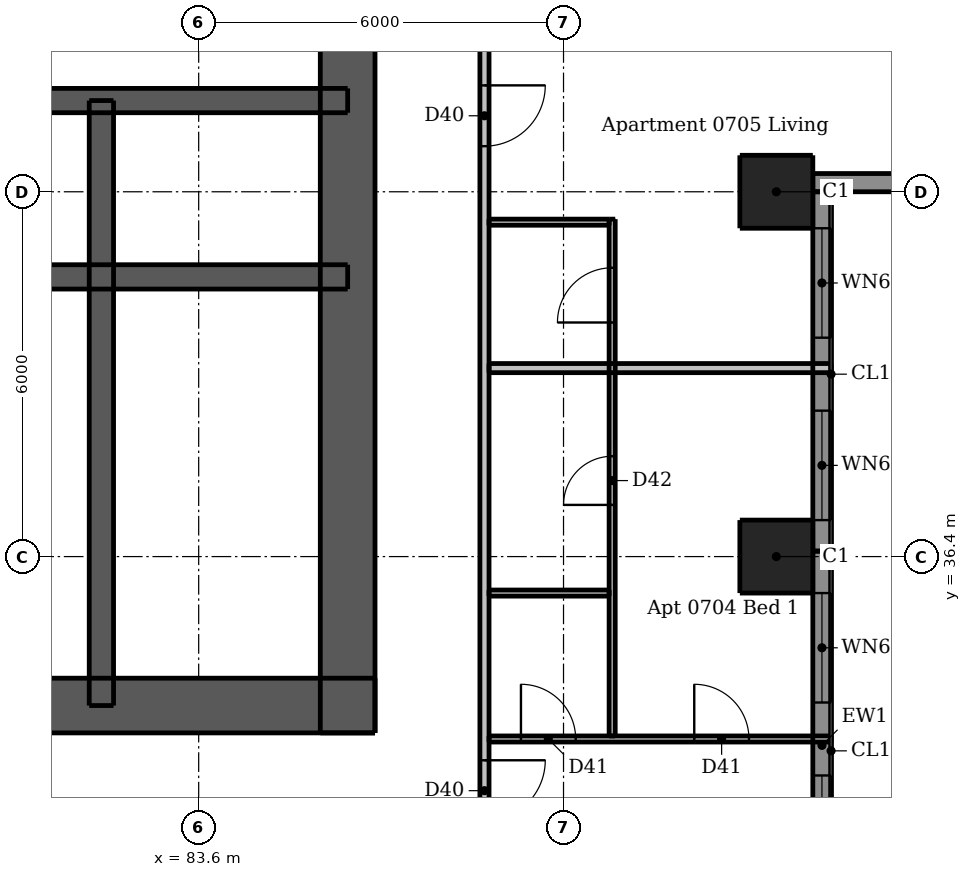
"""IFC4 building model, lengths in metres.
Left out: names, types, materials, properties, quantities, classifications, styles, units other than length and angle.
Written with IfcOpenShell. Run it as: python <this file> out.ifc"""

import sys

from ifc_helpers import new_model, si_unit, direction, frame, frame_2d, origin, origin_2d, place, context, subcontext, project, spatial, rectangle, extrude, element, fill, save


model = new_model("IFC4")
c1 = context("Model", 3, precision=1e-05, world=origin(), true_north=direction((0.0, 1.0)))
c2 = subcontext(c1, "Body", "Model", "MODEL_VIEW")
j1 = project(units=[si_unit("LENGTHUNIT", "METRE"), si_unit("PLANEANGLEUNIT", "RADIAN")], contexts=[c1])
p1 = place(None, origin())
s1 = spatial("IfcSite", under=j1, at=p1, CompositionType="ELEMENT")
p2 = place(p1, origin())
s2 = spatial("IfcBuilding", under=s1, at=p2, CompositionType="ELEMENT")
p3 = place(p2, frame((0.0, 0.0, 30.1)))
s3 = spatial("IfcBuildingStorey", under=s2, at=p3, CompositionType="ELEMENT", Elevation=30.1)
p4 = place(p3, frame((62.5, 33.95, 0.0), z_axis=(0.0, 0.0, 1.0), x_axis=(1.0, 0.0, 0.0)))
e1 = element("IfcWall", 1, at=p4, inside=s3, PredefinedType="SHEAR", context=c2, shape_type="SweptSolid", body=[
    extrude(rectangle(XDim=24.0, YDim=0.9, at=frame_2d((12.0, 0.0))), origin(), (0.0, 0.0, 1.0), 3.05),
])
p5 = place(p4, frame((2.05, 0.0, 0.0)))
e2 = element("IfcOpeningElement", 2, at=p5, cuts=e1, PredefinedType="OPENING", context=c2, shape_type="SweptSolid", body=[
    extrude(rectangle(XDim=1.1, YDim=2.1, at=frame_2d((0.55, 1.05))), frame((0.0, 0.46, 0.0), z_axis=(0.0, -1.0, 0.0), x_axis=(1.0, 0.0, 0.0)), (0.0, 0.0, 1.0), 0.92),
])
p6 = place(p4, frame((20.85, 0.0, 0.0)))
e3 = element("IfcOpeningElement", 3, at=p6, cuts=e1, PredefinedType="OPENING", context=c2, shape_type="SweptSolid", body=[
    extrude(rectangle(XDim=1.1, YDim=2.1, at=frame_2d((0.55, 1.05))), frame((0.0, 0.46, 0.0), z_axis=(0.0, -1.0, 0.0), x_axis=(1.0, 0.0, 0.0)), (0.0, 0.0, 1.0), 0.92),
])
p7 = place(p4, frame((8.0, 0.0, 0.0)))
e4 = element("IfcOpeningElement", 4, at=p7, cuts=e1, PredefinedType="OPENING", context=c2, shape_type="SweptSolid", body=[
    extrude(rectangle(XDim=1.1, YDim=2.1, at=frame_2d((0.55, 1.05))), frame((0.0, 0.46, 0.0), z_axis=(0.0, -1.0, 0.0), x_axis=(1.0, 0.0, 0.0)), (0.0, 0.0, 1.0), 0.92),
])
p8 = place(p4, frame((15.3, 0.0, 0.0)))
e5 = element("IfcOpeningElement", 5, at=p8, cuts=e1, PredefinedType="OPENING", context=c2, shape_type="SweptSolid", body=[
    extrude(rectangle(XDim=0.9, YDim=2.1, at=frame_2d((0.45, 1.05))), frame((0.0, 0.46, 0.0), z_axis=(0.0, -1.0, 0.0), x_axis=(1.0, 0.0, 0.0)), (0.0, 0.0, 1.0), 0.92),
])
p9 = place(p3, frame((86.05, 33.5, 0.0), z_axis=(0.0, 0.0, 1.0), x_axis=(0.0, 1.0, 0.0)))
e6 = element("IfcWall", 6, at=p9, inside=s3, PredefinedType="SHEAR", context=c2, shape_type="SweptSolid", body=[
    extrude(rectangle(XDim=24.0, YDim=0.9, at=frame_2d((12.0, 0.0))), origin(), (0.0, 0.0, 1.0), 3.05),
])
p10 = place(p9, frame((11.2, 0.0, 0.0)))
e7 = element("IfcOpeningElement", 7, at=p10, cuts=e6, PredefinedType="OPENING", context=c2, shape_type="SweptSolid", body=[
    extrude(rectangle(XDim=1.6, YDim=2.1, at=frame_2d((0.8, 1.05))), frame((0.0, 0.46, 0.0), z_axis=(0.0, -1.0, 0.0), x_axis=(1.0, 0.0, 0.0)), (0.0, 0.0, 1.0), 0.92),
])
p11 = place(p3, frame((62.95, 41.0, 0.0), z_axis=(0.0, 0.0, 1.0), x_axis=(1.0, 0.0, 0.0)))
e8 = element("IfcWall", 8, at=p11, inside=s3, PredefinedType="SHEAR", context=c2, shape_type="SweptSolid", body=[
    extrude(rectangle(XDim=23.1, YDim=0.4, at=frame_2d((11.55, 0.0))), origin(), (0.0, 0.0, 1.0), 3.05),
])
p12 = place(p3, frame((62.95, 43.9, 0.0), z_axis=(0.0, 0.0, 1.0), x_axis=(1.0, 0.0, 0.0)))
e9 = element("IfcWall", 9, at=p12, inside=s3, PredefinedType="SHEAR", context=c2, shape_type="SweptSolid", body=[
    extrude(rectangle(XDim=23.1, YDim=0.4, at=frame_2d((11.55, 0.0))), origin(), (0.0, 0.0, 1.0), 3.05),
])
p13 = place(p12, frame((1.7, 0.0, 0.0)))
e10 = element("IfcOpeningElement", 10, at=p13, cuts=e9, PredefinedType="OPENING", context=c2, shape_type="SweptSolid", body=[
    extrude(rectangle(XDim=0.9, YDim=2.1, at=frame_2d((0.45, 1.05))), frame((0.0, 0.21, 0.0), z_axis=(0.0, -1.0, 0.0), x_axis=(1.0, 0.0, 0.0)), (0.0, 0.0, 1.0), 0.42),
])
p14 = place(p12, frame((20.5, 0.0, 0.0)))
e11 = element("IfcOpeningElement", 11, at=p14, cuts=e9, PredefinedType="OPENING", context=c2, shape_type="SweptSolid", body=[
    extrude(rectangle(XDim=0.9, YDim=2.1, at=frame_2d((0.45, 1.05))), frame((0.0, 0.21, 0.0), z_axis=(0.0, -1.0, 0.0), x_axis=(1.0, 0.0, 0.0)), (0.0, 0.0, 1.0), 0.42),
])
p15 = place(p12, frame((4.75, 0.0, 0.0)))
e12 = element("IfcOpeningElement", 12, at=p15, cuts=e9, PredefinedType="OPENING", context=c2, shape_type="SweptSolid", body=[
    extrude(rectangle(XDim=1.1, YDim=2.1, at=frame_2d((0.55, 1.05))), frame((0.0, 0.21, 0.0), z_axis=(0.0, -1.0, 0.0), x_axis=(1.0, 0.0, 0.0)), (0.0, 0.0, 1.0), 0.42),
])
p16 = place(p12, frame((7.25, 0.0, 0.0)))
e13 = element("IfcOpeningElement", 13, at=p16, cuts=e9, PredefinedType="OPENING", context=c2, shape_type="SweptSolid", body=[
    extrude(rectangle(XDim=1.1, YDim=2.1, at=frame_2d((0.55, 1.05))), frame((0.0, 0.21, 0.0), z_axis=(0.0, -1.0, 0.0), x_axis=(1.0, 0.0, 0.0)), (0.0, 0.0, 1.0), 0.42),
])
p17 = place(p12, frame((9.75, 0.0, 0.0)))
e14 = element("IfcOpeningElement", 14, at=p17, cuts=e9, PredefinedType="OPENING", context=c2, shape_type="SweptSolid", body=[
    extrude(rectangle(XDim=1.1, YDim=2.1, at=frame_2d((0.55, 1.05))), frame((0.0, 0.21, 0.0), z_axis=(0.0, -1.0, 0.0), x_axis=(1.0, 0.0, 0.0)), (0.0, 0.0, 1.0), 0.42),
])
p18 = place(p12, frame((12.25, 0.0, 0.0)))
e15 = element("IfcOpeningElement", 15, at=p18, cuts=e9, PredefinedType="OPENING", context=c2, shape_type="SweptSolid", body=[
    extrude(rectangle(XDim=1.1, YDim=2.1, at=frame_2d((0.55, 1.05))), frame((0.0, 0.21, 0.0), z_axis=(0.0, -1.0, 0.0), x_axis=(1.0, 0.0, 0.0)), (0.0, 0.0, 1.0), 0.42),
])
p19 = place(p12, frame((14.75, 0.0, 0.0)))
e16 = element("IfcOpeningElement", 16, at=p19, cuts=e9, PredefinedType="OPENING", context=c2, shape_type="SweptSolid", body=[
    extrude(rectangle(XDim=1.1, YDim=2.1, at=frame_2d((0.55, 1.05))), frame((0.0, 0.21, 0.0), z_axis=(0.0, -1.0, 0.0), x_axis=(1.0, 0.0, 0.0)), (0.0, 0.0, 1.0), 0.42),
])
p20 = place(p12, frame((17.25, 0.0, 0.0)))
e17 = element("IfcOpeningElement", 17, at=p20, cuts=e9, PredefinedType="OPENING", context=c2, shape_type="SweptSolid", body=[
    extrude(rectangle(XDim=1.1, YDim=2.1, at=frame_2d((0.55, 1.05))), frame((0.0, 0.21, 0.0), z_axis=(0.0, -1.0, 0.0), x_axis=(1.0, 0.0, 0.0)), (0.0, 0.0, 1.0), 0.42),
])
p21 = place(p3, frame((82.0, 33.95, 0.0), z_axis=(0.0, 0.0, 1.0), x_axis=(0.0, 1.0, 0.0)))
e18 = element("IfcWall", 18, at=p21, inside=s3, PredefinedType="SHEAR", context=c2, shape_type="SweptSolid", body=[
    extrude(rectangle(XDim=9.95, YDim=0.4, at=frame_2d((4.975, 0.0))), origin(), (0.0, 0.0, 1.0), 3.05),
])
for number, where, z_axis, x_axis in (
    (19, (93.1, 36.4, 0.0), (0.0, 0.0, 1.0), (1.0, 0.0, 0.0)),
    (20, (93.1, 42.4, 0.0), (0.0, 0.0, 1.0), (1.0, 0.0, 0.0)),
):
    element("IfcColumn", number, at=place(p3, frame(where, z_axis=z_axis, x_axis=x_axis)), inside=s3, PredefinedType="COLUMN", context=c2, shape_type="SweptSolid", body=[
        extrude(rectangle(XDim=1.2, YDim=1.2, at=origin_2d()), origin(), (0.0, 0.0, 1.0), 3.05),
    ])
p22 = place(p3, frame((93.7, 42.55, 0.0), z_axis=(0.0, 0.0, 1.0), x_axis=(1.0, 0.0, 0.0)))
e21 = element("IfcWall", 21, at=p22, inside=s3, PredefinedType="SOLIDWALL", context=c2, shape_type="SweptSolid", body=[
    extrude(rectangle(XDim=4.8, YDim=0.3, at=frame_2d((2.4, 0.0))), origin(), (0.0, 0.0, 1.0), 3.05),
])
p23 = place(p22, frame((1.35, 0.0, 0.15)))
e22 = element("IfcOpeningElement", 22, at=p23, cuts=e21, PredefinedType="OPENING", context=c2, shape_type="SweptSolid", body=[
    extrude(rectangle(XDim=2.4, YDim=2.1, at=frame_2d((1.2, 1.05))), frame((0.0, 0.16, 0.0), z_axis=(0.0, -1.0, 0.0), x_axis=(1.0, 0.0, 0.0)), (0.0, 0.0, 1.0), 0.32),
])
p24 = place(p3, frame((93.85, 30.1, 0.0), z_axis=(0.0, 0.0, 1.0), x_axis=(0.0, 1.0, 0.0)))
e23 = element("IfcWall", 23, at=p24, inside=s3, PredefinedType="SOLIDWALL", context=c2, shape_type="SweptSolid", body=[
    extrude(rectangle(XDim=6.39, YDim=0.3, at=frame_2d((3.195, 0.0))), origin(), (0.0, 0.0, 1.0), 3.05),
])
p25 = place(p24, frame((0.9, 0.0, 0.15)))
e24 = element("IfcOpeningElement", 24, at=p25, cuts=e23, PredefinedType="OPENING", context=c2, shape_type="SweptSolid", body=[
    extrude(rectangle(XDim=1.8, YDim=2.1, at=frame_2d((0.9, 1.05))), frame((0.0, 0.16, 0.0), z_axis=(0.0, -1.0, 0.0), x_axis=(1.0, 0.0, 0.0)), (0.0, 0.0, 1.0), 0.32),
])
p26 = place(p24, frame((3.9, 0.0, 0.15)))
e25 = element("IfcOpeningElement", 25, at=p26, cuts=e23, PredefinedType="OPENING", context=c2, shape_type="SweptSolid", body=[
    extrude(rectangle(XDim=1.8, YDim=2.1, at=frame_2d((0.9, 1.05))), frame((0.0, 0.16, 0.0), z_axis=(0.0, -1.0, 0.0), x_axis=(1.0, 0.0, 0.0)), (0.0, 0.0, 1.0), 0.32),
])
p27 = place(p3, frame((93.85, 36.49, 0.0), z_axis=(0.0, 0.0, 1.0), x_axis=(0.0, 1.0, 0.0)))
e26 = element("IfcWall", 26, at=p27, inside=s3, PredefinedType="SOLIDWALL", context=c2, shape_type="SweptSolid", body=[
    extrude(rectangle(XDim=5.91, YDim=0.3, at=frame_2d((2.955, 0.0))), origin(), (0.0, 0.0, 1.0), 3.05),
])
p28 = place(p27, frame((0.51, 0.0, 0.15)))
e27 = element("IfcOpeningElement", 27, at=p28, cuts=e26, PredefinedType="OPENING", context=c2, shape_type="SweptSolid", body=[
    extrude(rectangle(XDim=1.8, YDim=2.1, at=frame_2d((0.9, 1.05))), frame((0.0, 0.16, 0.0), z_axis=(0.0, -1.0, 0.0), x_axis=(1.0, 0.0, 0.0)), (0.0, 0.0, 1.0), 0.32),
])
p29 = place(p27, frame((3.51, 0.0, 0.15)))
e28 = element("IfcOpeningElement", 28, at=p29, cuts=e26, PredefinedType="OPENING", context=c2, shape_type="SweptSolid", body=[
    extrude(rectangle(XDim=1.8, YDim=2.1, at=frame_2d((0.9, 1.05))), frame((0.0, 0.16, 0.0), z_axis=(0.0, -1.0, 0.0), x_axis=(1.0, 0.0, 0.0)), (0.0, 0.0, 1.0), 0.32),
])
p30 = place(p3, frame((90.4, 33.45, 0.0), z_axis=(0.0, 0.0, 1.0), x_axis=(0.0, 1.0, 0.0)))
e29 = element("IfcWall", 29, at=p30, inside=s3, PredefinedType="PARTITIONING", context=c2, shape_type="SweptSolid", body=[
    extrude(rectangle(XDim=8.5, YDim=0.1, at=frame_2d((4.25, 0.0))), origin(), (0.0, 0.0, 1.0), 3.05),
])
p31 = place(p30, frame((3.8, 0.0, 0.0)))
e30 = element("IfcOpeningElement", 30, at=p31, cuts=e29, PredefinedType="OPENING", context=c2, shape_type="SweptSolid", body=[
    extrude(rectangle(XDim=0.8, YDim=2.1, at=frame_2d((0.4, 1.05))), frame((0.0, 0.06, 0.0), z_axis=(0.0, -1.0, 0.0), x_axis=(1.0, 0.0, 0.0)), (0.0, 0.0, 1.0), 0.12),
])
p32 = place(p30, frame((6.8, 0.0, 0.0)))
e31 = element("IfcOpeningElement", 31, at=p32, cuts=e29, PredefinedType="OPENING", context=c2, shape_type="SweptSolid", body=[
    extrude(rectangle(XDim=0.9, YDim=2.1, at=frame_2d((0.45, 1.05))), frame((0.0, 0.06, 0.0), z_axis=(0.0, -1.0, 0.0), x_axis=(1.0, 0.0, 0.0)), (0.0, 0.0, 1.0), 0.12),
])
for number, where, z_axis, x_axis in (
    (32, (88.375, 41.9, 0.0), (0.0, 0.0, 1.0), (1.0, 0.0, 0.0)),
    (33, (88.375, 35.8, 0.0), (0.0, 0.0, 1.0), (1.0, 0.0, 0.0)),
):
    element("IfcWall", number, at=place(p3, frame(where, z_axis=z_axis, x_axis=x_axis)), inside=s3, PredefinedType="PARTITIONING", context=c2, shape_type="SweptSolid", body=[
        extrude(rectangle(XDim=1.975, YDim=0.1, at=frame_2d((0.988, 0.0))), origin(), (0.0, 0.0, 1.0), 3.05),
    ])
p33 = place(p3, frame((88.375, 33.4, 0.0), z_axis=(0.0, 0.0, 1.0), x_axis=(1.0, 0.0, 0.0)))
e34 = element("IfcWall", 34, at=p33, inside=s3, PredefinedType="PARTITIONING", context=c2, shape_type="SweptSolid", body=[
    extrude(rectangle(XDim=5.625, YDim=0.1, at=frame_2d((2.812, 0.0))), origin(), (0.0, 0.0, 1.0), 3.05),
])
p34 = place(p33, frame((0.525, 0.0, 0.0)))
e35 = element("IfcOpeningElement", 35, at=p34, cuts=e34, PredefinedType="OPENING", context=c2, shape_type="SweptSolid", body=[
    extrude(rectangle(XDim=0.9, YDim=2.1, at=frame_2d((0.45, 1.05))), frame((0.0, 0.06, 0.0), z_axis=(0.0, -1.0, 0.0), x_axis=(1.0, 0.0, 0.0)), (0.0, 0.0, 1.0), 0.12),
])
p35 = place(p33, frame((3.375, 0.0, 0.0)))
e36 = element("IfcOpeningElement", 36, at=p35, cuts=e34, PredefinedType="OPENING", context=c2, shape_type="SweptSolid", body=[
    extrude(rectangle(XDim=0.9, YDim=2.1, at=frame_2d((0.45, 1.05))), frame((0.0, 0.06, 0.0), z_axis=(0.0, -1.0, 0.0), x_axis=(1.0, 0.0, 0.0)), (0.0, 0.0, 1.0), 0.12),
])
p36 = place(p3, frame((88.3, 60.475, 0.0), z_axis=(0.0, 0.0, 1.0), x_axis=(0.0, -1.0, 0.0)))
e37 = element("IfcWall", 37, at=p36, inside=s3, PredefinedType="PARTITIONING", context=c2, shape_type="SweptSolid", body=[
    extrude(rectangle(XDim=28.7, YDim=0.15, at=frame_2d((14.35, 0.0))), origin(), (0.0, 0.0, 1.0), 3.05),
])
p37 = place(p36, frame((27.425, 0.0, 0.0)))
e38 = element("IfcOpeningElement", 38, at=p37, cuts=e37, PredefinedType="OPENING", context=c2, shape_type="SweptSolid", body=[
    extrude(rectangle(XDim=1.0, YDim=2.1, at=frame_2d((0.5, 1.05))), frame((0.0, 0.085, 0.0), z_axis=(0.0, -1.0, 0.0), x_axis=(1.0, 0.0, 0.0)), (0.0, 0.0, 1.0), 0.17),
])
p38 = place(p36, frame((16.325, 0.0, 0.0)))
e39 = element("IfcOpeningElement", 39, at=p38, cuts=e37, PredefinedType="OPENING", context=c2, shape_type="SweptSolid", body=[
    extrude(rectangle(XDim=1.0, YDim=2.1, at=frame_2d((0.5, 1.05))), frame((0.0, 0.085, 0.0), z_axis=(0.0, -1.0, 0.0), x_axis=(1.0, 0.0, 0.0)), (0.0, 0.0, 1.0), 0.17),
])
p39 = place(p36, frame((5.525, 0.0, 0.0)))
e40 = element("IfcOpeningElement", 40, at=p39, cuts=e37, PredefinedType="OPENING", context=c2, shape_type="SweptSolid", body=[
    extrude(rectangle(XDim=1.0, YDim=2.1, at=frame_2d((0.5, 1.05))), frame((0.0, 0.085, 0.0), z_axis=(0.0, -1.0, 0.0), x_axis=(1.0, 0.0, 0.0)), (0.0, 0.0, 1.0), 0.17),
])
p40 = place(p3, frame((88.375, 39.5, 0.0), z_axis=(0.0, 0.0, 1.0), x_axis=(1.0, 0.0, 0.0)))
e41 = element("IfcWall", 41, at=p40, inside=s3, PredefinedType="PARTITIONING", context=c2, shape_type="SweptSolid", body=[
    extrude(rectangle(XDim=5.625, YDim=0.15, at=frame_2d((2.812, 0.0))), origin(), (0.0, 0.0, 1.0), 3.05),
])
p41 = place(p25, origin())
e42 = element("IfcWindow", 42, at=p41, inside=s3, PartitioningType="DOUBLE_PANEL_VERTICAL", PredefinedType="WINDOW", context=c2, shape_type="SweptSolid", body=[
    extrude(rectangle(XDim=1.8, YDim=2.1, at=frame_2d((0.9, 1.05))), frame((0.0, 0.03, 0.0), z_axis=(0.0, -1.0, 0.0), x_axis=(1.0, 0.0, 0.0)), (0.0, 0.0, 1.0), 0.06),
])
fill(e24, e42)
p42 = place(p26, origin())
e43 = element("IfcWindow", 43, at=p42, inside=s3, PartitioningType="DOUBLE_PANEL_VERTICAL", PredefinedType="WINDOW", context=c2, shape_type="SweptSolid", body=[
    extrude(rectangle(XDim=1.8, YDim=2.1, at=frame_2d((0.9, 1.05))), frame((0.0, 0.03, 0.0), z_axis=(0.0, -1.0, 0.0), x_axis=(1.0, 0.0, 0.0)), (0.0, 0.0, 1.0), 0.06),
])
fill(e25, e43)
p43 = place(p28, origin())
e44 = element("IfcWindow", 44, at=p43, inside=s3, PartitioningType="DOUBLE_PANEL_VERTICAL", PredefinedType="WINDOW", context=c2, shape_type="SweptSolid", body=[
    extrude(rectangle(XDim=1.8, YDim=2.1, at=frame_2d((0.9, 1.05))), frame((0.0, 0.03, 0.0), z_axis=(0.0, -1.0, 0.0), x_axis=(1.0, 0.0, 0.0)), (0.0, 0.0, 1.0), 0.06),
])
fill(e27, e44)
p44 = place(p29, origin())
e45 = element("IfcWindow", 45, at=p44, inside=s3, PartitioningType="DOUBLE_PANEL_VERTICAL", PredefinedType="WINDOW", context=c2, shape_type="SweptSolid", body=[
    extrude(rectangle(XDim=1.8, YDim=2.1, at=frame_2d((0.9, 1.05))), frame((0.0, 0.03, 0.0), z_axis=(0.0, -1.0, 0.0), x_axis=(1.0, 0.0, 0.0)), (0.0, 0.0, 1.0), 0.06),
])
fill(e28, e45)
p45 = place(p6, origin())
e46 = element("IfcDoor", 46, at=p45, inside=s3, OperationType="SINGLE_SWING_RIGHT", PredefinedType="DOOR", context=c2, shape_type="SweptSolid", body=[
    extrude(rectangle(XDim=1.1, YDim=2.1, at=frame_2d((0.55, 1.05))), frame((0.0, 0.438, 0.0), z_axis=(0.0, -1.0, 0.0), x_axis=(1.0, 0.0, 0.0)), (0.0, 0.0, 1.0), 0.05),
])
fill(e3, e46)
p46 = place(p14, origin())
e47 = element("IfcDoor", 47, at=p46, inside=s3, OperationType="SINGLE_SWING_LEFT", PredefinedType="DOOR", context=c2, shape_type="SweptSolid", body=[
    extrude(rectangle(XDim=0.9, YDim=2.1, at=frame_2d((0.45, 1.05))), frame((0.0, -0.138, 0.0), z_axis=(0.0, -1.0, 0.0), x_axis=(1.0, 0.0, 0.0)), (0.0, 0.0, 1.0), 0.05),
])
fill(e11, e47)
p47 = place(p20, origin())
e48 = element("IfcDoor", 48, at=p47, inside=s3, OperationType="DOUBLE_DOOR_SLIDING", PredefinedType="DOOR", context=c2, shape_type="SweptSolid", body=[
    extrude(rectangle(XDim=1.1, YDim=2.1, at=frame_2d((0.55, 1.05))), frame((0.0, 0.025, 0.0), z_axis=(0.0, -1.0, 0.0), x_axis=(1.0, 0.0, 0.0)), (0.0, 0.0, 1.0), 0.05),
])
fill(e17, e48)
p48 = place(p37, origin())
e49 = element("IfcDoor", 49, at=p48, inside=s3, OperationType="SINGLE_SWING_LEFT", PredefinedType="DOOR", context=c2, shape_type="SweptSolid", body=[
    extrude(rectangle(XDim=1.0, YDim=2.1, at=frame_2d((0.5, 1.05))), frame((0.0, 0.025, 0.0), z_axis=(0.0, -1.0, 0.0), x_axis=(1.0, 0.0, 0.0)), (0.0, 0.0, 1.0), 0.05),
])
fill(e38, e49)
p49 = place(p34, origin())
e50 = element("IfcDoor", 50, at=p49, inside=s3, OperationType="SINGLE_SWING_LEFT", PredefinedType="DOOR", context=c2, shape_type="SweptSolid", body=[
    extrude(rectangle(XDim=0.9, YDim=2.1, at=frame_2d((0.45, 1.05))), frame((0.0, 0.025, 0.0), z_axis=(0.0, -1.0, 0.0), x_axis=(1.0, 0.0, 0.0)), (0.0, 0.0, 1.0), 0.05),
])
fill(e35, e50)
p50 = place(p35, origin())
e51 = element("IfcDoor", 51, at=p50, inside=s3, OperationType="SINGLE_SWING_LEFT", PredefinedType="DOOR", context=c2, shape_type="SweptSolid", body=[
    extrude(rectangle(XDim=0.9, YDim=2.1, at=frame_2d((0.45, 1.05))), frame((0.0, 0.025, 0.0), z_axis=(0.0, -1.0, 0.0), x_axis=(1.0, 0.0, 0.0)), (0.0, 0.0, 1.0), 0.05),
])
fill(e36, e51)
p51 = place(p31, origin())
e52 = element("IfcDoor", 52, at=p51, inside=s3, OperationType="SINGLE_SWING_LEFT", PredefinedType="DOOR", context=c2, shape_type="SweptSolid", body=[
    extrude(rectangle(XDim=0.8, YDim=2.1, at=frame_2d((0.4, 1.05))), frame((0.0, 0.025, 0.0), z_axis=(0.0, -1.0, 0.0), x_axis=(1.0, 0.0, 0.0)), (0.0, 0.0, 1.0), 0.05),
])
fill(e30, e52)
p52 = place(p38, origin())
e53 = element("IfcDoor", 53, at=p52, inside=s3, OperationType="SINGLE_SWING_LEFT", PredefinedType="DOOR", context=c2, shape_type="SweptSolid", body=[
    extrude(rectangle(XDim=1.0, YDim=2.1, at=frame_2d((0.5, 1.05))), frame((0.0, 0.025, 0.0), z_axis=(0.0, -1.0, 0.0), x_axis=(1.0, 0.0, 0.0)), (0.0, 0.0, 1.0), 0.05),
])
fill(e39, e53)
p53 = place(p32, origin())
e54 = element("IfcDoor", 54, at=p53, inside=s3, OperationType="SINGLE_SWING_LEFT", PredefinedType="DOOR", context=c2, shape_type="SweptSolid", body=[
    extrude(rectangle(XDim=0.9, YDim=2.1, at=frame_2d((0.45, 1.05))), frame((0.0, 0.025, 0.0), z_axis=(0.0, -1.0, 0.0), x_axis=(1.0, 0.0, 0.0)), (0.0, 0.0, 1.0), 0.05),
])
fill(e31, e54)
save(model, sys.argv[1])
